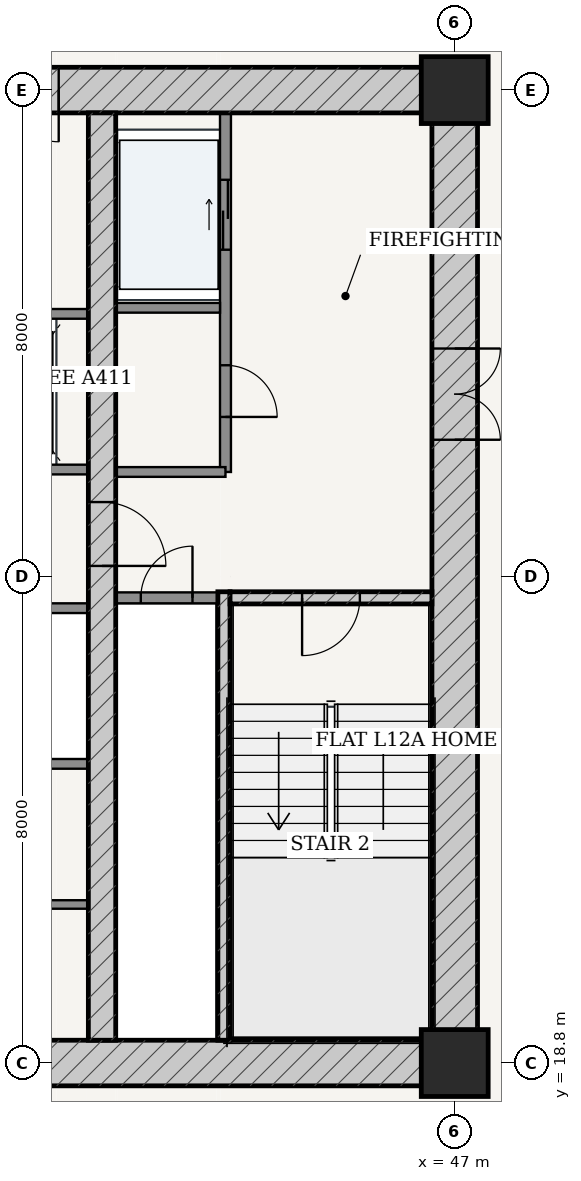
"""IFC4 building model, lengths in metres.
Left out: names, types, materials, properties, quantities, classifications, styles, units other than length and angle.
Written with IfcOpenShell. Run it as: python <this file> out.ifc"""

import sys

from ifc_helpers import new_model, si_unit, direction, frame, frame_2d, origin, origin_2d, place, context, subcontext, project, spatial, rectangle, extrude, source, transform, mapped, element, fill, save


model = new_model("IFC4")
c1 = context("Model", 3, precision=1e-05, world=origin(), true_north=direction((-0.2419218956, 0.970295726276)))
c2 = subcontext(c1, "Body", "Model", "MODEL_VIEW")
j1 = project(units=[si_unit("LENGTHUNIT", "METRE"), si_unit("PLANEANGLEUNIT", "RADIAN")], contexts=[c1])
p1 = place(None, origin())
s1 = spatial("IfcSite", under=j1, at=p1, CompositionType="ELEMENT")
p2 = place(p1, origin())
s2 = spatial("IfcBuilding", under=s1, at=p2, CompositionType="ELEMENT")
p3 = place(p2, frame((0.0, 0.0, 49.2)))
s3 = spatial("IfcBuildingStorey", under=s2, at=p3, CompositionType="ELEMENT", Elevation=49.2)
for number, where, z_axis, x_axis in (
    (1, (47.0, 18.8, 0.0), (0.0, 0.0, 1.0), (1.0, 0.0, 0.0)),
    (2, (47.0, 34.8, 0.0), (0.0, 0.0, 1.0), (1.0, 0.0, 0.0)),
):
    element("IfcColumn", number, at=place(p3, frame(where, z_axis=z_axis, x_axis=x_axis)), inside=s3, PredefinedType="COLUMN", context=c2, shape_type="SweptSolid", body=[
        extrude(rectangle(XDim=1.1, YDim=1.1, at=origin_2d()), origin(), (0.0, 0.0, 1.0), 3.6),
    ])
p4 = place(p3, frame((28.625, 18.8, 0.0), z_axis=(0.0, 0.0, 1.0), x_axis=(1.0, 0.0, 0.0)))
e3 = element("IfcWall", 3, at=p4, inside=s3, PredefinedType="SHEAR", context=c2, shape_type="SweptSolid", body=[
    extrude(rectangle(XDim=18.75, YDim=0.75, at=frame_2d((9.375, 0.0))), origin(), (0.0, 0.0, 1.0), 3.32),
])
p5 = place(p4, frame((7.627, 0.0, 0.0)))
e4 = element("IfcOpeningElement", 4, at=p5, cuts=e3, PredefinedType="OPENING", context=c2, shape_type="SweptSolid", body=[
    extrude(rectangle(XDim=0.85, YDim=2.1, at=frame_2d((0.425, 1.05))), frame((0.0, 0.385, 0.0), z_axis=(0.0, -1.0, 0.0), x_axis=(1.0, 0.0, 0.0)), (0.0, 0.0, 1.0), 0.77),
])
p6 = place(p4, frame((10.673, 0.0, 0.0)))
e5 = element("IfcOpeningElement", 5, at=p6, cuts=e3, PredefinedType="OPENING", context=c2, shape_type="SweptSolid", body=[
    extrude(rectangle(XDim=0.85, YDim=2.1, at=frame_2d((0.425, 1.05))), frame((0.0, 0.385, 0.0), z_axis=(0.0, -1.0, 0.0), x_axis=(1.0, 0.0, 0.0)), (0.0, 0.0, 1.0), 0.77),
])
p7 = place(p3, frame((28.625, 34.8, 0.0), z_axis=(0.0, 0.0, 1.0), x_axis=(1.0, 0.0, 0.0)))
e6 = element("IfcWall", 6, at=p7, inside=s3, PredefinedType="SHEAR", context=c2, shape_type="SweptSolid", body=[
    extrude(rectangle(XDim=18.75, YDim=0.75, at=frame_2d((9.375, 0.0))), origin(), (0.0, 0.0, 1.0), 3.32),
])
p8 = place(p7, frame((6.887, 0.0, 0.0)))
e7 = element("IfcOpeningElement", 7, at=p8, cuts=e6, PredefinedType="OPENING", context=c2, shape_type="SweptSolid", body=[
    extrude(rectangle(XDim=0.85, YDim=2.1, at=frame_2d((0.425, 1.05))), frame((0.0, 0.385, 0.0), z_axis=(0.0, -1.0, 0.0), x_axis=(1.0, 0.0, 0.0)), (0.0, 0.0, 1.0), 0.77),
])
p9 = place(p7, frame((8.945, 0.0, 0.0)))
e8 = element("IfcOpeningElement", 8, at=p9, cuts=e6, PredefinedType="OPENING", context=c2, shape_type="SweptSolid", body=[
    extrude(rectangle(XDim=0.86, YDim=2.1, at=frame_2d((0.43, 1.05))), frame((0.0, 0.385, 0.0), z_axis=(0.0, -1.0, 0.0), x_axis=(1.0, 0.0, 0.0)), (0.0, 0.0, 1.0), 0.77),
])
p10 = place(p7, frame((11.012, 0.0, 0.0)))
e9 = element("IfcOpeningElement", 9, at=p10, cuts=e6, PredefinedType="OPENING", context=c2, shape_type="SweptSolid", body=[
    extrude(rectangle(XDim=0.85, YDim=2.1, at=frame_2d((0.425, 1.05))), frame((0.0, 0.385, 0.0), z_axis=(0.0, -1.0, 0.0), x_axis=(1.0, 0.0, 0.0)), (0.0, 0.0, 1.0), 0.77),
])
p11 = place(p3, frame((47.0, 19.175, 0.0), z_axis=(0.0, 0.0, 1.0), x_axis=(0.0, 1.0, 0.0)))
e10 = element("IfcWall", 10, at=p11, inside=s3, PredefinedType="SHEAR", context=c2, shape_type="SweptSolid", body=[
    extrude(rectangle(XDim=15.25, YDim=0.75, at=frame_2d((7.625, 0.0))), origin(), (0.0, 0.0, 1.0), 3.32),
])
p12 = place(p11, frame((9.875, 0.0, 0.0)))
e11 = element("IfcOpeningElement", 11, at=p12, cuts=e10, PredefinedType="OPENING", context=c2, shape_type="SweptSolid", body=[
    extrude(rectangle(XDim=1.5, YDim=2.2, at=frame_2d((0.75, 1.1))), frame((0.0, 0.385, 0.0), z_axis=(0.0, -1.0, 0.0), x_axis=(1.0, 0.0, 0.0)), (0.0, 0.0, 1.0), 0.77),
])
p13 = place(p3, frame((43.205, 19.175, 0.0), z_axis=(0.0, 0.0, 1.0), x_axis=(0.0, 1.0, 0.0)))
e12 = element("IfcWall", 12, at=p13, inside=s3, PredefinedType="SOLIDWALL", context=c2, shape_type="SweptSolid", body=[
    extrude(rectangle(XDim=7.375, YDim=0.2, at=frame_2d((3.688, 0.0))), origin(), (0.0, 0.0, 1.0), 3.32),
])
p14 = place(p3, frame((43.305, 26.45, 0.0), z_axis=(0.0, 0.0, 1.0), x_axis=(1.0, 0.0, 0.0)))
e13 = element("IfcWall", 13, at=p14, inside=s3, PredefinedType="SOLIDWALL", context=c2, shape_type="SweptSolid", body=[
    extrude(rectangle(XDim=3.32, YDim=0.2, at=frame_2d((1.66, 0.0))), origin(), (0.0, 0.0, 1.0), 3.32),
])
p15 = place(p14, frame((1.185, 0.0, 0.0)))
e14 = element("IfcOpeningElement", 14, at=p15, cuts=e13, PredefinedType="OPENING", context=c2, shape_type="SweptSolid", body=[
    extrude(rectangle(XDim=0.95, YDim=2.15, at=frame_2d((0.475, 1.075))), frame((0.0, 0.11, 0.0), z_axis=(0.0, -1.0, 0.0), x_axis=(1.0, 0.0, 0.0)), (0.0, 0.0, 1.0), 0.22),
])
p16 = place(p3, frame((41.2, 19.175, 0.0), z_axis=(0.0, 0.0, 1.0), x_axis=(0.0, 1.0, 0.0)))
e15 = element("IfcWall", 15, at=p16, inside=s3, PredefinedType="SHEAR", context=c2, shape_type="SweptSolid", body=[
    extrude(rectangle(XDim=15.25, YDim=0.45, at=frame_2d((7.625, 0.0))), origin(), (0.0, 0.0, 1.0), 3.32),
])
p17 = place(p16, frame((7.8, 0.0, 0.0)))
e16 = element("IfcOpeningElement", 16, at=p17, cuts=e15, PredefinedType="OPENING", context=c2, shape_type="SweptSolid", body=[
    extrude(rectangle(XDim=1.05, YDim=2.15, at=frame_2d((0.525, 1.075))), frame((0.0, 0.235, 0.0), z_axis=(0.0, -1.0, 0.0), x_axis=(1.0, 0.0, 0.0)), (0.0, 0.0, 1.0), 0.47),
])
p18 = place(p3, frame((41.425, 26.45, 0.0), z_axis=(0.0, 0.0, 1.0), x_axis=(1.0, 0.0, 0.0)))
e17 = element("IfcWall", 17, at=p18, inside=s3, PredefinedType="PARTITIONING", context=c2, shape_type="SweptSolid", body=[
    extrude(rectangle(XDim=1.675, YDim=0.18, at=frame_2d((0.837, 0.0))), origin(), (0.0, 0.0, 1.0), 3.32),
])
p19 = place(p18, frame((0.413, 0.0, 0.0)))
e18 = element("IfcOpeningElement", 18, at=p19, cuts=e17, PredefinedType="OPENING", context=c2, shape_type="SweptSolid", body=[
    extrude(rectangle(XDim=0.85, YDim=2.1, at=frame_2d((0.425, 1.05))), frame((0.0, 0.1, 0.0), z_axis=(0.0, -1.0, 0.0), x_axis=(1.0, 0.0, 0.0)), (0.0, 0.0, 1.0), 0.2),
])
p20 = place(p3, frame((43.23, 28.52, 0.0), z_axis=(0.0, 0.0, 1.0), x_axis=(0.0, 1.0, 0.0)))
e19 = element("IfcWall", 19, at=p20, inside=s3, PredefinedType="PARTITIONING", context=c2, shape_type="SweptSolid", body=[
    extrude(rectangle(XDim=5.905, YDim=0.18, at=frame_2d((2.953, 0.0))), origin(), (0.0, 0.0, 1.0), 3.32),
])
p21 = place(p20, frame((0.905, 0.0, 0.0)))
e20 = element("IfcOpeningElement", 20, at=p21, cuts=e19, PredefinedType="OPENING", context=c2, shape_type="SweptSolid", body=[
    extrude(rectangle(XDim=0.85, YDim=2.1, at=frame_2d((0.425, 1.05))), frame((0.0, 0.1, 0.0), z_axis=(0.0, -1.0, 0.0), x_axis=(1.0, 0.0, 0.0)), (0.0, 0.0, 1.0), 0.2),
])
p22 = place(p20, frame((3.655, 0.0, 0.0)))
e21 = element("IfcOpeningElement", 21, at=p22, cuts=e19, PredefinedType="OPENING", context=c2, shape_type="SweptSolid", body=[
    extrude(rectangle(XDim=1.15, YDim=2.2, at=frame_2d((0.575, 1.1))), frame((0.0, 0.1, 0.0), z_axis=(0.0, -1.0, 0.0), x_axis=(1.0, 0.0, 0.0)), (0.0, 0.0, 1.0), 0.2),
])
p23 = place(p3, frame((41.425, 31.22, 0.0), z_axis=(0.0, 0.0, 1.0), x_axis=(1.0, 0.0, 0.0)))
e22 = element("IfcWall", 22, at=p23, inside=s3, PredefinedType="PARTITIONING", context=c2, shape_type="SweptSolid", body=[
    extrude(rectangle(XDim=1.715, YDim=0.16, at=frame_2d((0.857, 0.0))), origin(), (0.0, 0.0, 1.0), 3.32),
])
p24 = place(p3, frame((41.425, 28.52, 0.0), z_axis=(0.0, 0.0, 1.0), x_axis=(1.0, 0.0, 0.0)))
e23 = element("IfcWall", 23, at=p24, inside=s3, PredefinedType="PARTITIONING", context=c2, shape_type="SweptSolid", body=[
    extrude(rectangle(XDim=1.805, YDim=0.16, at=frame_2d((0.902, 0.0))), origin(), (0.0, 0.0, 1.0), 3.32),
])
p25 = place(p3, frame((35.025, 28.56, 0.0), z_axis=(0.0, 0.0, 1.0), x_axis=(1.0, 0.0, 0.0)))
e24 = element("IfcWall", 24, at=p25, inside=s3, PredefinedType="PARTITIONING", context=c2, shape_type="SweptSolid", body=[
    extrude(rectangle(XDim=5.95, YDim=0.16, at=frame_2d((2.975, 0.0))), origin(), (0.0, 0.0, 1.0), 3.32),
])
p26 = place(p25, frame((0.76, 0.0, 0.0)))
e25 = element("IfcOpeningElement", 25, at=p26, cuts=e24, PredefinedType="OPENING", context=c2, shape_type="SweptSolid", body=[
    extrude(rectangle(XDim=1.1, YDim=2.2, at=frame_2d((0.55, 1.1))), frame((0.0, 0.09, 0.0), z_axis=(0.0, -1.0, 0.0), x_axis=(1.0, 0.0, 0.0)), (0.0, 0.0, 1.0), 0.18),
])
p27 = place(p25, frame((2.425, 0.0, 0.0)))
e26 = element("IfcOpeningElement", 26, at=p27, cuts=e24, PredefinedType="OPENING", context=c2, shape_type="SweptSolid", body=[
    extrude(rectangle(XDim=1.1, YDim=2.2, at=frame_2d((0.55, 1.1))), frame((0.0, 0.09, 0.0), z_axis=(0.0, -1.0, 0.0), x_axis=(1.0, 0.0, 0.0)), (0.0, 0.0, 1.0), 0.18),
])
p28 = place(p25, frame((4.09, 0.0, 0.0)))
e27 = element("IfcOpeningElement", 27, at=p28, cuts=e24, PredefinedType="OPENING", context=c2, shape_type="SweptSolid", body=[
    extrude(rectangle(XDim=1.1, YDim=2.2, at=frame_2d((0.55, 1.1))), frame((0.0, 0.09, 0.0), z_axis=(0.0, -1.0, 0.0), x_axis=(1.0, 0.0, 0.0)), (0.0, 0.0, 1.0), 0.18),
])
for number, where, z_axis, x_axis in (
    (28, (35.025, 31.12, 0.0), (0.0, 0.0, 1.0), (1.0, 0.0, 0.0)),
    (29, (35.025, 26.28, 0.0), (0.0, 0.0, 1.0), (1.0, 0.0, 0.0)),
    (30, (35.025, 23.72, 0.0), (0.0, 0.0, 1.0), (1.0, 0.0, 0.0)),
):
    element("IfcWall", number, at=place(p3, frame(where, z_axis=z_axis, x_axis=x_axis)), inside=s3, PredefinedType="PARTITIONING", context=c2, shape_type="SweptSolid", body=[
        extrude(rectangle(XDim=5.95, YDim=0.16, at=frame_2d((2.975, 0.0))), origin(), (0.0, 0.0, 1.0), 3.32),
    ])
p29 = place(p3, frame((38.4, 21.407, 0.0), z_axis=(0.0, 0.0, 1.0), x_axis=(1.0, 0.0, 0.0)))
e31 = element("IfcWall", 31, at=p29, inside=s3, PredefinedType="PARTITIONING", context=c2, shape_type="SweptSolid", body=[
    extrude(rectangle(XDim=2.575, YDim=0.14, at=frame_2d((1.288, 0.0))), origin(), (0.0, 0.0, 1.0), 3.32),
])
p30 = place(p29, frame((0.863, 0.0, 0.0)))
e32 = element("IfcOpeningElement", 32, at=p30, cuts=e31, PredefinedType="OPENING", context=c2, shape_type="SweptSolid", body=[
    extrude(rectangle(XDim=0.85, YDim=2.1, at=frame_2d((0.425, 1.05))), frame((0.0, 0.08, 0.0), z_axis=(0.0, -1.0, 0.0), x_axis=(1.0, 0.0, 0.0)), (0.0, 0.0, 1.0), 0.16),
])
m1 = source(origin(), c2, "Body", "SweptSolid", [
    extrude(rectangle(XDim=1.5, YDim=2.2, at=frame_2d((0.75, 1.1))), frame((0.0, 0.025, 0.0), z_axis=(0.0, -1.0, 0.0), x_axis=(1.0, 0.0, 0.0)), (0.0, 0.0, 1.0), 0.05),
])
p31 = place(p12, frame((1.5, 0.0, 0.0), z_axis=(0.0, 0.0, 1.0), x_axis=(-1.0, 0.0, 0.0)))
e33 = element("IfcDoor", 33, at=p31, inside=s3, OperationType="DOUBLE_DOOR_SINGLE_SWING", PredefinedType="DOOR", context=c2, shape_type="MappedRepresentation", body=[
    mapped(m1, transform((0.0, 0.0, 0.0), scale=1.0)),
])
fill(e11, e33)
m2 = source(origin(), c2, "Body", "SweptSolid", [
    extrude(rectangle(XDim=1.05, YDim=2.15, at=frame_2d((0.525, 1.075))), frame((0.0, 0.025, 0.0), z_axis=(0.0, -1.0, 0.0), x_axis=(1.0, 0.0, 0.0)), (0.0, 0.0, 1.0), 0.05),
])
p32 = place(p17, frame((1.05, 0.0, 0.0), z_axis=(0.0, 0.0, 1.0), x_axis=(-1.0, 0.0, 0.0)))
e34 = element("IfcDoor", 34, at=p32, inside=s3, OperationType="SINGLE_SWING_RIGHT", PredefinedType="DOOR", context=c2, shape_type="MappedRepresentation", body=[
    mapped(m2, transform((0.0, 0.0, 0.0), scale=1.0)),
])
fill(e16, e34)
m3 = source(origin(), c2, "Body", "SweptSolid", [
    extrude(rectangle(XDim=0.95, YDim=2.15, at=frame_2d((0.475, 1.075))), frame((0.0, 0.025, 0.0), z_axis=(0.0, -1.0, 0.0), x_axis=(1.0, 0.0, 0.0)), (0.0, 0.0, 1.0), 0.05),
])
p33 = place(p15, frame((0.95, 0.0, 0.0), z_axis=(0.0, 0.0, 1.0), x_axis=(-1.0, 0.0, 0.0)))
e35 = element("IfcDoor", 35, at=p33, inside=s3, OperationType="SINGLE_SWING_RIGHT", PredefinedType="DOOR", context=c2, shape_type="MappedRepresentation", body=[
    mapped(m3, transform((0.0, 0.0, 0.0), scale=1.0)),
])
fill(e14, e35)
m4 = source(origin(), c2, "Body", "SweptSolid", [
    extrude(rectangle(XDim=0.85, YDim=2.1, at=frame_2d((0.425, 1.05))), frame((0.0, 0.025, 0.0), z_axis=(0.0, -1.0, 0.0), x_axis=(1.0, 0.0, 0.0)), (0.0, 0.0, 1.0), 0.05),
])
p34 = place(p19, origin())
e36 = element("IfcDoor", 36, at=p34, inside=s3, OperationType="SINGLE_SWING_RIGHT", PredefinedType="DOOR", context=c2, shape_type="MappedRepresentation", body=[
    mapped(m4, transform((0.0, 0.0, 0.0), scale=1.0)),
])
fill(e18, e36)
p35 = place(p21, frame((0.85, 0.0, 0.0), z_axis=(0.0, 0.0, 1.0), x_axis=(-1.0, 0.0, 0.0)))
e37 = element("IfcDoor", 37, at=p35, inside=s3, OperationType="SINGLE_SWING_RIGHT", PredefinedType="DOOR", context=c2, shape_type="MappedRepresentation", body=[
    mapped(m4, transform((0.0, 0.0, 0.0), scale=1.0)),
])
fill(e20, e37)
p36 = place(p10, frame((0.85, 0.0, 0.0), z_axis=(0.0, 0.0, 1.0), x_axis=(-1.0, 0.0, 0.0)))
e38 = element("IfcDoor", 38, at=p36, inside=s3, OperationType="SINGLE_SWING_LEFT", PredefinedType="DOOR", context=c2, shape_type="MappedRepresentation", body=[
    mapped(m4, transform((0.0, 0.0, 0.0), scale=1.0)),
])
fill(e9, e38)
m5 = source(origin(), c2, "Body", "SweptSolid", [
    extrude(rectangle(XDim=1.15, YDim=2.2, at=frame_2d((0.575, 1.1))), frame((0.0, 0.025, 0.0), z_axis=(0.0, -1.0, 0.0), x_axis=(1.0, 0.0, 0.0)), (0.0, 0.0, 1.0), 0.05),
])
p37 = place(p22, origin())
e39 = element("IfcDoor", 39, at=p37, inside=s3, OperationType="DOUBLE_DOOR_SLIDING", PredefinedType="DOOR", context=c2, shape_type="MappedRepresentation", body=[
    mapped(m5, transform((0.0, 0.0, 0.0), scale=1.0)),
])
fill(e21, e39)
save(model, sys.argv[1])
